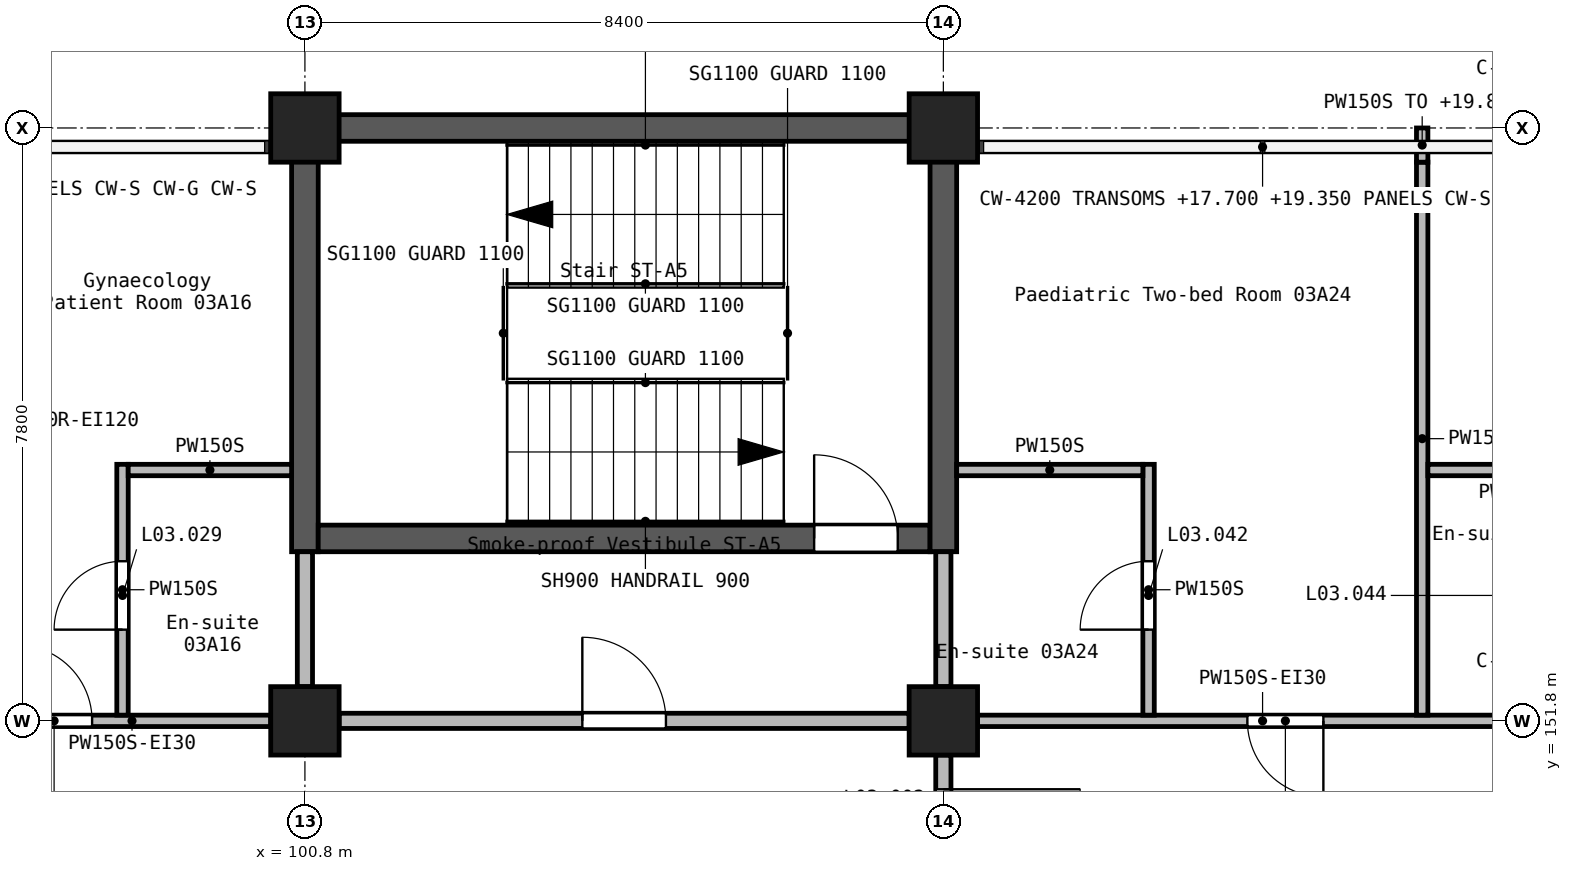
"""IFC4 building model, lengths in metres.
Left out: names, types, materials, properties, quantities, classifications, styles, units other than length and angle.
Written with IfcOpenShell. Run it as: python <this file> out.ifc"""

import sys

from ifc_helpers import new_model, si_unit, direction, frame, frame_2d, origin, origin_2d, place, context, subcontext, project, spatial, rectangle, extrude, element, fill, save


model = new_model("IFC4")
c1 = context("Model", 3, precision=1e-05, world=origin(), true_north=direction((0.0, 1.0)))
c2 = subcontext(c1, "Body", "Model", "MODEL_VIEW")
j1 = project(units=[si_unit("LENGTHUNIT", "METRE"), si_unit("PLANEANGLEUNIT", "RADIAN")], contexts=[c1])
p1 = place(None, origin())
s1 = spatial("IfcSite", under=j1, at=p1, CompositionType="ELEMENT")
p2 = place(p1, origin())
s2 = spatial("IfcBuilding", under=s1, at=p2, CompositionType="ELEMENT")
p3 = place(p2, frame((0.0, 0.0, 16.8)))
s3 = spatial("IfcBuildingStorey", under=s2, at=p3, CompositionType="ELEMENT", Elevation=16.8)
for number, where, z_axis, x_axis in (
    (1, (100.8, 151.8, 0.0), (0.0, 0.0, 1.0), (1.0, 0.0, 0.0)),
    (2, (100.8, 159.6, 0.0), (0.0, 0.0, 1.0), (1.0, 0.0, 0.0)),
    (3, (109.2, 151.8, 0.0), (0.0, 0.0, 1.0), (1.0, 0.0, 0.0)),
    (4, (109.2, 159.6, 0.0), (0.0, 0.0, 1.0), (1.0, 0.0, 0.0)),
):
    element("IfcColumn", number, at=place(p3, frame(where, z_axis=z_axis, x_axis=x_axis)), inside=s3, PredefinedType="COLUMN", context=c2, shape_type="SweptSolid", body=[
        extrude(rectangle(XDim=0.9, YDim=0.9, at=origin_2d()), origin(), (0.0, 0.0, 1.0), 4.2),
    ])
p4 = place(p3, frame((100.625, 159.6, 0.0), z_axis=(0.0, 0.0, 1.0), x_axis=(1.0, 0.0, 0.0)))
e5 = element("IfcWall", 5, at=p4, inside=s3, PredefinedType="SHEAR", context=c2, shape_type="SweptSolid", body=[
    extrude(rectangle(XDim=8.4, YDim=0.35, at=frame_2d((4.2, 0.0))), origin(), (0.0, 0.0, 1.0), 4.2),
])
p5 = place(p3, frame((100.8, 154.025, 0.0), z_axis=(0.0, 0.0, 1.0), x_axis=(0.0, 1.0, 0.0)))
e6 = element("IfcWall", 6, at=p5, inside=s3, PredefinedType="SHEAR", context=c2, shape_type="SweptSolid", body=[
    extrude(rectangle(XDim=5.4, YDim=0.35, at=frame_2d((2.7, 0.0))), origin(), (0.0, 0.0, 1.0), 4.2),
])
p6 = place(p3, frame((100.975, 154.2, 0.0), z_axis=(0.0, 0.0, 1.0), x_axis=(1.0, 0.0, 0.0)))
e7 = element("IfcWall", 7, at=p6, inside=s3, PredefinedType="SHEAR", context=c2, shape_type="SweptSolid", body=[
    extrude(rectangle(XDim=8.05, YDim=0.35, at=frame_2d((4.025, 0.0))), origin(), (0.0, 0.0, 1.0), 4.2),
])
p7 = place(p6, frame((6.525, 0.0, 0.0)))
e8 = element("IfcOpeningElement", 8, at=p7, cuts=e7, PredefinedType="OPENING", context=c2, shape_type="SweptSolid", body=[
    extrude(rectangle(XDim=1.1, YDim=2.1, at=frame_2d((0.55, 1.05))), frame((0.0, 0.185, 0.0), z_axis=(0.0, -1.0, 0.0), x_axis=(1.0, 0.0, 0.0)), (0.0, 0.0, 1.0), 0.37),
])
p8 = place(p3, frame((109.2, 154.025, 0.0), z_axis=(0.0, 0.0, 1.0), x_axis=(0.0, 1.0, 0.0)))
e9 = element("IfcWall", 9, at=p8, inside=s3, PredefinedType="SHEAR", context=c2, shape_type="SweptSolid", body=[
    extrude(rectangle(XDim=5.75, YDim=0.35, at=frame_2d((2.875, 0.0))), origin(), (0.0, 0.0, 1.0), 4.2),
])
p9 = place(p3, frame((109.2, 154.025, 0.0), z_axis=(0.0, 0.0, 1.0), x_axis=(0.0, -1.0, 0.0)))
e10 = element("IfcWall", 10, at=p9, inside=s3, PredefinedType="SOLIDWALL", context=c2, shape_type="SweptSolid", body=[
    extrude(rectangle(XDim=1.775, YDim=0.2, at=frame_2d((0.887, 0.0))), origin(), (0.0, 0.0, 1.0), 3.9),
])
p10 = place(p3, frame((109.2, 151.35, 0.0), z_axis=(0.0, 0.0, 1.0), x_axis=(0.0, -1.0, 0.0)))
e11 = element("IfcWall", 11, at=p10, inside=s3, PredefinedType="SOLIDWALL", context=c2, shape_type="SweptSolid", body=[
    extrude(rectangle(XDim=2.7, YDim=0.2, at=frame_2d((1.35, 0.0))), origin(), (0.0, 0.0, 1.0), 3.9),
])
p11 = place(p10, frame((0.45, 0.0, 0.0)))
e12 = element("IfcOpeningElement", 12, at=p11, cuts=e11, PredefinedType="OPENING", context=c2, shape_type="SweptSolid", body=[
    extrude(rectangle(XDim=1.8, YDim=2.1, at=frame_2d((0.9, 1.05))), frame((0.0, 0.11, 0.0), z_axis=(0.0, -1.0, 0.0), x_axis=(1.0, 0.0, 0.0)), (0.0, 0.0, 1.0), 0.22),
])
p12 = place(p3, frame((101.25, 151.8, 0.0), z_axis=(0.0, 0.0, 1.0), x_axis=(1.0, 0.0, 0.0)))
e13 = element("IfcWall", 13, at=p12, inside=s3, PredefinedType="SOLIDWALL", context=c2, shape_type="SweptSolid", body=[
    extrude(rectangle(XDim=7.5, YDim=0.2, at=frame_2d((3.75, 0.0))), origin(), (0.0, 0.0, 1.0), 3.9),
])
p13 = place(p12, frame((3.2, 0.0, 0.0)))
e14 = element("IfcOpeningElement", 14, at=p13, cuts=e13, PredefinedType="OPENING", context=c2, shape_type="SweptSolid", body=[
    extrude(rectangle(XDim=1.1, YDim=2.1, at=frame_2d((0.55, 1.05))), frame((0.0, 0.11, 0.0), z_axis=(0.0, -1.0, 0.0), x_axis=(1.0, 0.0, 0.0)), (0.0, 0.0, 1.0), 0.22),
])
p14 = place(p3, frame((100.8, 152.25, 0.0), z_axis=(0.0, 0.0, 1.0), x_axis=(0.0, 1.0, 0.0)))
e15 = element("IfcWall", 15, at=p14, inside=s3, PredefinedType="SOLIDWALL", context=c2, shape_type="SweptSolid", body=[
    extrude(rectangle(XDim=1.775, YDim=0.2, at=frame_2d((0.887, 0.0))), origin(), (0.0, 0.0, 1.0), 3.9),
])
p15 = place(p3, frame((117.15, 151.8, 0.0), z_axis=(0.0, 0.0, 1.0), x_axis=(-1.0, 0.0, 0.0)))
e16 = element("IfcWall", 16, at=p15, inside=s3, PredefinedType="PARTITIONING", context=c2, shape_type="SweptSolid", body=[
    extrude(rectangle(XDim=7.5, YDim=0.15, at=frame_2d((3.75, 0.0))), origin(), (0.0, 0.0, 1.0), 3.9),
])
p16 = place(p15, frame((2.95, 0.0, 0.0)))
e17 = element("IfcOpeningElement", 17, at=p16, cuts=e16, PredefinedType="OPENING", context=c2, shape_type="SweptSolid", body=[
    extrude(rectangle(XDim=1.0, YDim=2.1, at=frame_2d((0.5, 1.05))), frame((0.0, 0.085, 0.0), z_axis=(0.0, -1.0, 0.0), x_axis=(1.0, 0.0, 0.0)), (0.0, 0.0, 1.0), 0.17),
])
p17 = place(p3, frame((96.7, 151.8, 0.0), z_axis=(0.0, 0.0, 1.0), x_axis=(1.0, 0.0, 0.0)))
e18 = element("IfcWall", 18, at=p17, inside=s3, PredefinedType="PARTITIONING", context=c2, shape_type="SweptSolid", body=[
    extrude(rectangle(XDim=3.65, YDim=0.15, at=frame_2d((1.825, 0.0))), origin(), (0.0, 0.0, 1.0), 3.9),
])
p18 = place(p17, frame((0.3, 0.0, 0.0)))
e19 = element("IfcOpeningElement", 19, at=p18, cuts=e18, PredefinedType="OPENING", context=c2, shape_type="SweptSolid", body=[
    extrude(rectangle(XDim=1.0, YDim=2.1, at=frame_2d((0.5, 1.05))), frame((0.0, 0.085, 0.0), z_axis=(0.0, -1.0, 0.0), x_axis=(1.0, 0.0, 0.0)), (0.0, 0.0, 1.0), 0.17),
])
p19 = place(p3, frame((115.5, 151.875, 0.0), z_axis=(0.0, 0.0, 1.0), x_axis=(0.0, 1.0, 0.0)))
e20 = element("IfcWall", 20, at=p19, inside=s3, PredefinedType="PARTITIONING", context=c2, shape_type="SweptSolid", body=[
    extrude(rectangle(XDim=7.275, YDim=0.15, at=frame_2d((3.637, 0.0))), origin(), (0.0, 0.0, 1.0), 3.9),
])
p20 = place(p3, frame((115.5, 159.15, 0.0), z_axis=(0.0, 0.0, 1.0), x_axis=(0.0, 1.0, 0.0)))
e21 = element("IfcWall", 21, at=p20, inside=s3, PredefinedType="PARTITIONING", context=c2, shape_type="SweptSolid", body=[
    extrude(rectangle(XDim=0.45, YDim=0.15, at=frame_2d((0.225, 0.0))), origin(), (0.0, 0.0, 1.0), 3.08),
])
p21 = place(p3, frame((98.4, 151.875, 0.0), z_axis=(0.0, 0.0, 1.0), x_axis=(0.0, 1.0, 0.0)))
e22 = element("IfcWall", 22, at=p21, inside=s3, PredefinedType="PARTITIONING", context=c2, shape_type="SweptSolid", body=[
    extrude(rectangle(XDim=3.3, YDim=0.15, at=frame_2d((1.65, 0.0))), origin(), (0.0, 0.0, 1.0), 3.9),
])
p22 = place(p21, frame((1.125, 0.0, 0.0)))
e23 = element("IfcOpeningElement", 23, at=p22, cuts=e22, PredefinedType="OPENING", context=c2, shape_type="SweptSolid", body=[
    extrude(rectangle(XDim=0.9, YDim=2.1, at=frame_2d((0.45, 1.05))), frame((0.0, 0.085, 0.0), z_axis=(0.0, -1.0, 0.0), x_axis=(1.0, 0.0, 0.0)), (0.0, 0.0, 1.0), 0.17),
])
p23 = place(p3, frame((111.9, 151.875, 0.0), z_axis=(0.0, 0.0, 1.0), x_axis=(0.0, 1.0, 0.0)))
e24 = element("IfcWall", 24, at=p23, inside=s3, PredefinedType="PARTITIONING", context=c2, shape_type="SweptSolid", body=[
    extrude(rectangle(XDim=3.3, YDim=0.15, at=frame_2d((1.65, 0.0))), origin(), (0.0, 0.0, 1.0), 3.9),
])
p24 = place(p23, frame((1.125, 0.0, 0.0)))
e25 = element("IfcOpeningElement", 25, at=p24, cuts=e24, PredefinedType="OPENING", context=c2, shape_type="SweptSolid", body=[
    extrude(rectangle(XDim=0.9, YDim=2.1, at=frame_2d((0.45, 1.05))), frame((0.0, 0.085, 0.0), z_axis=(0.0, -1.0, 0.0), x_axis=(1.0, 0.0, 0.0)), (0.0, 0.0, 1.0), 0.17),
])
p25 = place(p3, frame((109.375, 155.1, 0.0), z_axis=(0.0, 0.0, 1.0), x_axis=(1.0, 0.0, 0.0)))
e26 = element("IfcWall", 26, at=p25, inside=s3, PredefinedType="PARTITIONING", context=c2, shape_type="SweptSolid", body=[
    extrude(rectangle(XDim=2.45, YDim=0.15, at=frame_2d((1.225, 0.0))), origin(), (0.0, 0.0, 1.0), 3.9),
])
p26 = place(p3, frame((115.575, 155.1, 0.0), z_axis=(0.0, 0.0, 1.0), x_axis=(1.0, 0.0, 0.0)))
e27 = element("IfcWall", 27, at=p26, inside=s3, PredefinedType="PARTITIONING", context=c2, shape_type="SweptSolid", body=[
    extrude(rectangle(XDim=2.25, YDim=0.15, at=frame_2d((1.125, 0.0))), origin(), (0.0, 0.0, 1.0), 3.9),
])
p27 = place(p3, frame((98.475, 155.1, 0.0), z_axis=(0.0, 0.0, 1.0), x_axis=(1.0, 0.0, 0.0)))
e28 = element("IfcWall", 28, at=p27, inside=s3, PredefinedType="PARTITIONING", context=c2, shape_type="SweptSolid", body=[
    extrude(rectangle(XDim=2.15, YDim=0.15, at=frame_2d((1.075, 0.0))), origin(), (0.0, 0.0, 1.0), 3.9),
])
p28 = place(p11, origin())
e29 = element("IfcDoor", 29, at=p28, inside=s3, OperationType="DOUBLE_DOOR_SINGLE_SWING", PredefinedType="DOOR", context=c2, shape_type="SweptSolid", body=[
    extrude(rectangle(XDim=1.8, YDim=2.1, at=frame_2d((0.9, 1.05))), frame((0.0, 0.025, 0.0), z_axis=(0.0, -1.0, 0.0), x_axis=(1.0, 0.0, 0.0)), (0.0, 0.0, 1.0), 0.05),
])
fill(e12, e29)
p29 = place(p18, origin())
e30 = element("IfcDoor", 30, at=p29, inside=s3, OperationType="SINGLE_SWING_LEFT", PredefinedType="DOOR", context=c2, shape_type="SweptSolid", body=[
    extrude(rectangle(XDim=1.0, YDim=2.1, at=frame_2d((0.5, 1.05))), frame((0.0, 0.025, 0.0), z_axis=(0.0, -1.0, 0.0), x_axis=(1.0, 0.0, 0.0)), (0.0, 0.0, 1.0), 0.05),
])
fill(e19, e30)
p30 = place(p22, frame((0.9, 0.0, 0.0), z_axis=(0.0, 0.0, 1.0), x_axis=(-1.0, 0.0, 0.0)))
e31 = element("IfcDoor", 31, at=p30, inside=s3, OperationType="SINGLE_SWING_RIGHT", PredefinedType="DOOR", context=c2, shape_type="SweptSolid", body=[
    extrude(rectangle(XDim=0.9, YDim=2.1, at=frame_2d((0.45, 1.05))), frame((0.0, 0.025, 0.0), z_axis=(0.0, -1.0, 0.0), x_axis=(1.0, 0.0, 0.0)), (0.0, 0.0, 1.0), 0.05),
])
fill(e23, e31)
p31 = place(p16, frame((1.0, 0.0, 0.0), z_axis=(0.0, 0.0, 1.0), x_axis=(-1.0, 0.0, 0.0)))
e32 = element("IfcDoor", 32, at=p31, inside=s3, OperationType="SINGLE_SWING_RIGHT", PredefinedType="DOOR", context=c2, shape_type="SweptSolid", body=[
    extrude(rectangle(XDim=1.0, YDim=2.1, at=frame_2d((0.5, 1.05))), frame((0.0, 0.025, 0.0), z_axis=(0.0, -1.0, 0.0), x_axis=(1.0, 0.0, 0.0)), (0.0, 0.0, 1.0), 0.05),
])
fill(e17, e32)
p32 = place(p24, origin())
e33 = element("IfcDoor", 33, at=p32, inside=s3, OperationType="SINGLE_SWING_LEFT", PredefinedType="DOOR", context=c2, shape_type="SweptSolid", body=[
    extrude(rectangle(XDim=0.9, YDim=2.1, at=frame_2d((0.45, 1.05))), frame((0.0, 0.025, 0.0), z_axis=(0.0, -1.0, 0.0), x_axis=(1.0, 0.0, 0.0)), (0.0, 0.0, 1.0), 0.05),
])
fill(e25, e33)
p33 = place(p7, origin())
e34 = element("IfcDoor", 34, at=p33, inside=s3, OperationType="SINGLE_SWING_RIGHT", PredefinedType="DOOR", context=c2, shape_type="SweptSolid", body=[
    extrude(rectangle(XDim=1.1, YDim=2.1, at=frame_2d((0.55, 1.05))), frame((0.0, 0.025, 0.0), z_axis=(0.0, -1.0, 0.0), x_axis=(1.0, 0.0, 0.0)), (0.0, 0.0, 1.0), 0.05),
])
fill(e8, e34)
p34 = place(p13, origin())
e35 = element("IfcDoor", 35, at=p34, inside=s3, OperationType="SINGLE_SWING_RIGHT", PredefinedType="DOOR", context=c2, shape_type="SweptSolid", body=[
    extrude(rectangle(XDim=1.1, YDim=2.1, at=frame_2d((0.55, 1.05))), frame((0.0, 0.025, 0.0), z_axis=(0.0, -1.0, 0.0), x_axis=(1.0, 0.0, 0.0)), (0.0, 0.0, 1.0), 0.05),
])
fill(e14, e35)
save(model, sys.argv[1])
